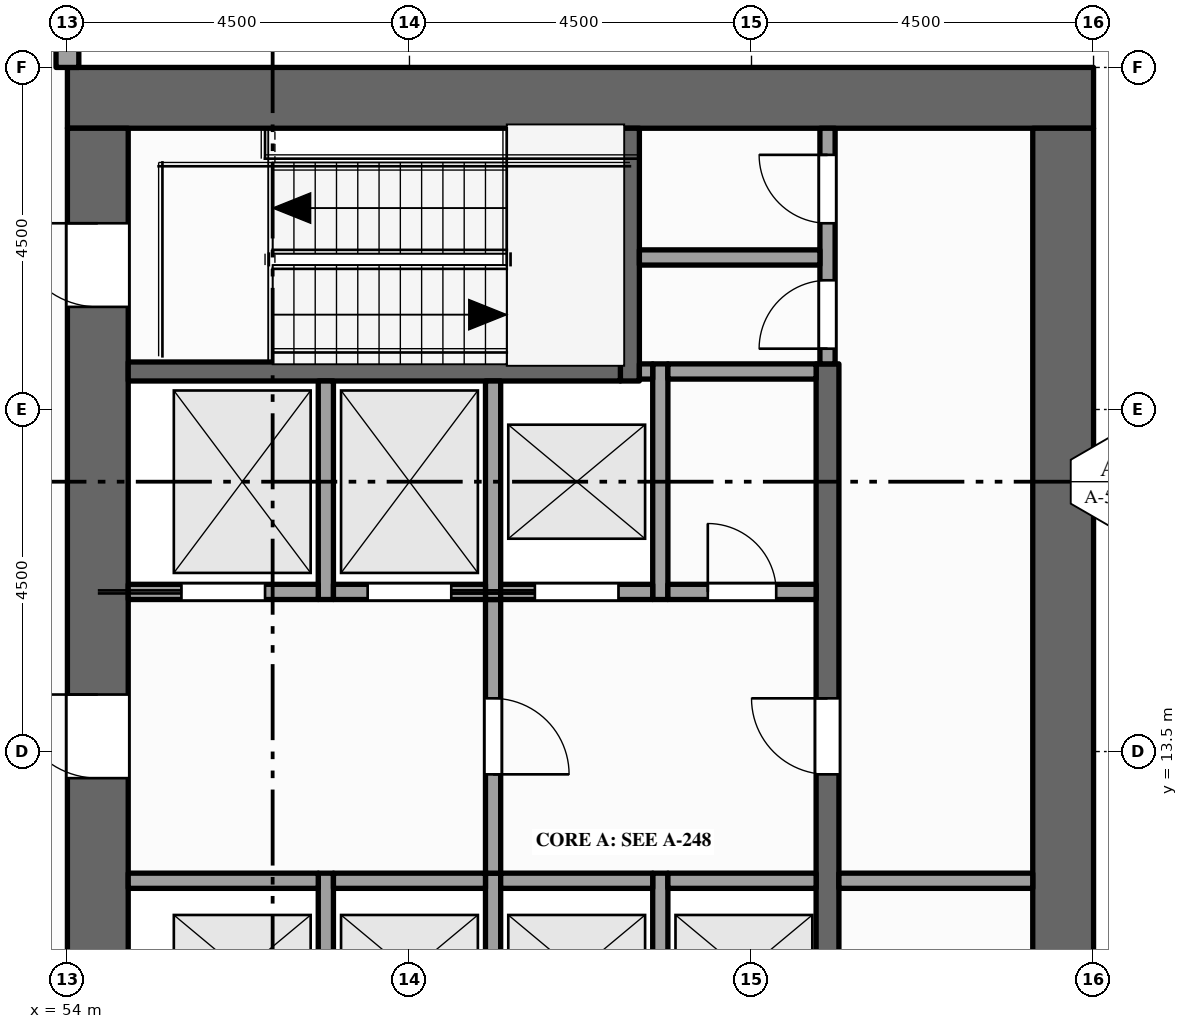
"""IFC4 building model, lengths in metres.
Left out: names, types, materials, properties, quantities, classifications, styles, units other than length and angle.
Written with IfcOpenShell. Run it as: python <this file> out.ifc"""

import sys

from ifc_helpers import new_model, si_unit, direction, frame, frame_2d, origin, place, context, subcontext, project, spatial, rectangle, extrude, element, fill, save


model = new_model("IFC4")
c1 = context("Model", 3, precision=1e-05, world=origin(), true_north=direction((0.0, 1.0)))
c2 = subcontext(c1, "Body", "Model", "MODEL_VIEW")
j1 = project(units=[si_unit("LENGTHUNIT", "METRE"), si_unit("PLANEANGLEUNIT", "RADIAN")], contexts=[c1])
p1 = place(None, origin())
s1 = spatial("IfcSite", under=j1, at=p1, CompositionType="ELEMENT")
p2 = place(p1, origin())
s2 = spatial("IfcBuilding", under=s1, at=p2, CompositionType="ELEMENT")
p3 = place(p2, frame((0.0, 0.0, 273.0)))
s3 = spatial("IfcBuildingStorey", under=s2, at=p3, CompositionType="ELEMENT", Elevation=273.0)
p4 = place(p3, frame((54.0, 22.1, -0.15), z_axis=(0.0, 0.0, 1.0), x_axis=(1.0, 0.0, 0.0)))
e1 = element("IfcWall", 1, at=p4, inside=s3, PredefinedType="SHEAR", context=c2, shape_type="SweptSolid", body=[
    extrude(rectangle(XDim=13.5, YDim=0.8, at=frame_2d((6.75, 0.0))), origin(), (0.0, 0.0, 1.0), 4.0),
])
p5 = place(p3, frame((54.4, 0.8, -0.15), z_axis=(0.0, 0.0, 1.0), x_axis=(0.0, 1.0, 0.0)))
e2 = element("IfcWall", 2, at=p5, inside=s3, PredefinedType="SHEAR", context=c2, shape_type="SweptSolid", body=[
    extrude(rectangle(XDim=20.9, YDim=0.8, at=frame_2d((10.45, 0.0))), origin(), (0.0, 0.0, 1.0), 4.0),
])
p6 = place(p5, frame((6.3, 0.0, 0.15)))
e3 = element("IfcOpeningElement", 3, at=p6, cuts=e2, PredefinedType="OPENING", context=c2, shape_type="SweptSolid", body=[
    extrude(rectangle(XDim=1.8, YDim=2.1, at=frame_2d((0.9, 1.05))), frame((0.0, 0.41, 0.0), z_axis=(0.0, -1.0, 0.0), x_axis=(1.0, 0.0, 0.0)), (0.0, 0.0, 1.0), 0.82),
])
p7 = place(p5, frame((12.35, 0.0, 0.15)))
e4 = element("IfcOpeningElement", 4, at=p7, cuts=e2, PredefinedType="OPENING", context=c2, shape_type="SweptSolid", body=[
    extrude(rectangle(XDim=1.1, YDim=2.1, at=frame_2d((0.55, 1.05))), frame((0.0, 0.41, 0.0), z_axis=(0.0, -1.0, 0.0), x_axis=(1.0, 0.0, 0.0)), (0.0, 0.0, 1.0), 0.82),
])
p8 = place(p5, frame((1.35, 0.0, 0.15)))
e5 = element("IfcOpeningElement", 5, at=p8, cuts=e2, PredefinedType="OPENING", context=c2, shape_type="SweptSolid", body=[
    extrude(rectangle(XDim=1.1, YDim=2.1, at=frame_2d((0.55, 1.05))), frame((0.0, 0.41, 0.0), z_axis=(0.0, -1.0, 0.0), x_axis=(1.0, 0.0, 0.0)), (0.0, 0.0, 1.0), 0.82),
])
p9 = place(p5, frame((18.55, 0.0, 0.15)))
e6 = element("IfcOpeningElement", 6, at=p9, cuts=e2, PredefinedType="OPENING", context=c2, shape_type="SweptSolid", body=[
    extrude(rectangle(XDim=1.1, YDim=2.1, at=frame_2d((0.55, 1.05))), frame((0.0, 0.41, 0.0), z_axis=(0.0, -1.0, 0.0), x_axis=(1.0, 0.0, 0.0)), (0.0, 0.0, 1.0), 0.82),
])
p10 = place(p3, frame((67.1, 0.8, -0.15), z_axis=(0.0, 0.0, 1.0), x_axis=(0.0, 1.0, 0.0)))
e7 = element("IfcWall", 7, at=p10, inside=s3, PredefinedType="SHEAR", context=c2, shape_type="SweptSolid", body=[
    extrude(rectangle(XDim=20.9, YDim=0.8, at=frame_2d((10.45, 0.0))), origin(), (0.0, 0.0, 1.0), 4.0),
])
p11 = place(p3, frame((54.0, 22.5, 0.0), z_axis=(0.0, 0.0, 1.0), x_axis=(0.0, 1.0, 0.0)))
e8 = element("IfcWall", 8, at=p11, inside=s3, PredefinedType="STANDARD", context=c2, shape_type="SweptSolid", body=[
    extrude(rectangle(XDim=1.175, YDim=0.3, at=frame_2d((0.587, 0.0))), origin(), (0.0, 0.0, 1.0), 3.162),
])
p12 = place(p3, frame((57.4, 9.3, 0.0), z_axis=(0.0, 0.0, 1.0), x_axis=(0.0, 1.0, 0.0)))
e9 = element("IfcWall", 9, at=p12, inside=s3, PredefinedType="SOLIDWALL", context=c2, shape_type="SweptSolid", body=[
    extrude(rectangle(XDim=2.6, YDim=0.2, at=frame_2d((1.3, 0.0))), origin(), (0.0, 0.0, 1.0), 3.85),
])
p13 = place(p3, frame((57.4, 15.5, 0.0), z_axis=(0.0, 0.0, 1.0), x_axis=(0.0, 1.0, 0.0)))
e10 = element("IfcWall", 10, at=p13, inside=s3, PredefinedType="SOLIDWALL", context=c2, shape_type="SweptSolid", body=[
    extrude(rectangle(XDim=2.875, YDim=0.2, at=frame_2d((1.438, 0.0))), origin(), (0.0, 0.0, 1.0), 3.85),
])
p14 = place(p3, frame((59.6, 9.3, 0.0), z_axis=(0.0, 0.0, 1.0), x_axis=(0.0, 1.0, 0.0)))
e11 = element("IfcWall", 11, at=p14, inside=s3, PredefinedType="SOLIDWALL", context=c2, shape_type="SweptSolid", body=[
    extrude(rectangle(XDim=2.6, YDim=0.2, at=frame_2d((1.3, 0.0))), origin(), (0.0, 0.0, 1.0), 3.85),
])
p15 = place(p3, frame((59.6, 11.9, 0.0), z_axis=(0.0, 0.0, 1.0), x_axis=(0.0, 1.0, 0.0)))
e12 = element("IfcWall", 12, at=p15, inside=s3, PredefinedType="PARTITIONING", context=c2, shape_type="SweptSolid", body=[
    extrude(rectangle(XDim=3.6, YDim=0.2, at=frame_2d((1.8, 0.0))), origin(), (0.0, 0.0, 1.0), 3.85),
])
p16 = place(p15, frame((1.3, 0.0, 0.0)))
e13 = element("IfcOpeningElement", 13, at=p16, cuts=e12, PredefinedType="OPENING", context=c2, shape_type="SweptSolid", body=[
    extrude(rectangle(XDim=1.0, YDim=2.1, at=frame_2d((0.5, 1.05))), frame((0.0, 0.11, 0.0), z_axis=(0.0, -1.0, 0.0), x_axis=(1.0, 0.0, 0.0)), (0.0, 0.0, 1.0), 0.22),
])
p17 = place(p3, frame((59.6, 15.5, 0.0), z_axis=(0.0, 0.0, 1.0), x_axis=(0.0, 1.0, 0.0)))
e14 = element("IfcWall", 14, at=p17, inside=s3, PredefinedType="SOLIDWALL", context=c2, shape_type="SweptSolid", body=[
    extrude(rectangle(XDim=2.875, YDim=0.2, at=frame_2d((1.438, 0.0))), origin(), (0.0, 0.0, 1.0), 3.85),
])
p18 = place(p3, frame((61.4, 18.375, 0.0), z_axis=(0.0, 0.0, 1.0), x_axis=(0.0, 1.0, 0.0)))
e15 = element("IfcWall", 15, at=p18, inside=s3, PredefinedType="SHEAR", context=c2, shape_type="SweptSolid", body=[
    extrude(rectangle(XDim=3.325, YDim=0.25, at=frame_2d((1.663, 0.0))), origin(), (0.0, 0.0, 1.0), 3.85),
])
p19 = place(p3, frame((61.8, 9.3, 0.0), z_axis=(0.0, 0.0, 1.0), x_axis=(0.0, 1.0, 0.0)))
e16 = element("IfcWall", 16, at=p19, inside=s3, PredefinedType="SOLIDWALL", context=c2, shape_type="SweptSolid", body=[
    extrude(rectangle(XDim=2.6, YDim=0.2, at=frame_2d((1.3, 0.0))), origin(), (0.0, 0.0, 1.0), 3.85),
])
p20 = place(p3, frame((61.8, 15.5, 0.0), z_axis=(0.0, 0.0, 1.0), x_axis=(0.0, 1.0, 0.0)))
e17 = element("IfcWall", 17, at=p20, inside=s3, PredefinedType="SOLIDWALL", context=c2, shape_type="SweptSolid", body=[
    extrude(rectangle(XDim=3.1, YDim=0.2, at=frame_2d((1.55, 0.0))), origin(), (0.0, 0.0, 1.0), 3.85),
])
p21 = place(p3, frame((64.0, 4.1, 0.0), z_axis=(0.0, 0.0, 1.0), x_axis=(0.0, 1.0, 0.0)))
e18 = element("IfcWall", 18, at=p21, inside=s3, PredefinedType="SHEAR", context=c2, shape_type="SweptSolid", body=[
    extrude(rectangle(XDim=14.5, YDim=0.3, at=frame_2d((7.25, 0.0))), origin(), (0.0, 0.0, 1.0), 3.85),
])
p22 = place(p21, frame((3.4, 0.0, 0.0)))
e19 = element("IfcOpeningElement", 19, at=p22, cuts=e18, PredefinedType="OPENING", context=c2, shape_type="SweptSolid", body=[
    extrude(rectangle(XDim=1.0, YDim=2.1, at=frame_2d((0.5, 1.05))), frame((0.0, 0.16, 0.0), z_axis=(0.0, -1.0, 0.0), x_axis=(1.0, 0.0, 0.0)), (0.0, 0.0, 1.0), 0.32),
])
p23 = place(p21, frame((9.1, 0.0, 0.0)))
e20 = element("IfcOpeningElement", 20, at=p23, cuts=e18, PredefinedType="OPENING", context=c2, shape_type="SweptSolid", body=[
    extrude(rectangle(XDim=1.0, YDim=2.1, at=frame_2d((0.5, 1.05))), frame((0.0, 0.16, 0.0), z_axis=(0.0, -1.0, 0.0), x_axis=(1.0, 0.0, 0.0)), (0.0, 0.0, 1.0), 0.32),
])
p24 = place(p3, frame((64.0, 18.6, 0.0), z_axis=(0.0, 0.0, 1.0), x_axis=(0.0, 1.0, 0.0)))
e21 = element("IfcWall", 21, at=p24, inside=s3, PredefinedType="PARTITIONING", context=c2, shape_type="SweptSolid", body=[
    extrude(rectangle(XDim=3.1, YDim=0.2, at=frame_2d((1.55, 0.0))), origin(), (0.0, 0.0, 1.0), 3.85),
])
p25 = place(p24, frame((0.2, 0.0, 0.0)))
e22 = element("IfcOpeningElement", 22, at=p25, cuts=e21, PredefinedType="OPENING", context=c2, shape_type="SweptSolid", body=[
    extrude(rectangle(XDim=0.9, YDim=2.1, at=frame_2d((0.45, 1.05))), frame((0.0, 0.11, 0.0), z_axis=(0.0, -1.0, 0.0), x_axis=(1.0, 0.0, 0.0)), (0.0, 0.0, 1.0), 0.22),
])
p26 = place(p24, frame((1.85, 0.0, 0.0)))
e23 = element("IfcOpeningElement", 23, at=p26, cuts=e21, PredefinedType="OPENING", context=c2, shape_type="SweptSolid", body=[
    extrude(rectangle(XDim=0.9, YDim=2.1, at=frame_2d((0.45, 1.05))), frame((0.0, 0.11, 0.0), z_axis=(0.0, -1.0, 0.0), x_axis=(1.0, 0.0, 0.0)), (0.0, 0.0, 1.0), 0.22),
])
p27 = place(p3, frame((54.8, 11.8, 0.0), z_axis=(0.0, 0.0, 1.0), x_axis=(1.0, 0.0, 0.0)))
e24 = element("IfcWall", 24, at=p27, inside=s3, PredefinedType="SOLIDWALL", context=c2, shape_type="SweptSolid", body=[
    extrude(rectangle(XDim=2.5, YDim=0.2, at=frame_2d((1.25, 0.0))), origin(), (0.0, 0.0, 1.0), 3.85),
])
for number, where, z_axis, x_axis in (
    (25, (57.5, 11.8, 0.0), (0.0, 0.0, 1.0), (1.0, 0.0, 0.0)),
    (26, (59.7, 11.8, 0.0), (0.0, 0.0, 1.0), (1.0, 0.0, 0.0)),
):
    element("IfcWall", number, at=place(p3, frame(where, z_axis=z_axis, x_axis=x_axis)), inside=s3, PredefinedType="SOLIDWALL", context=c2, shape_type="SweptSolid", body=[
        extrude(rectangle(XDim=2.0, YDim=0.2, at=frame_2d((1.0, 0.0))), origin(), (0.0, 0.0, 1.0), 3.85),
    ])
p28 = place(p3, frame((61.9, 11.8, 0.0), z_axis=(0.0, 0.0, 1.0), x_axis=(1.0, 0.0, 0.0)))
e27 = element("IfcWall", 27, at=p28, inside=s3, PredefinedType="SOLIDWALL", context=c2, shape_type="SweptSolid", body=[
    extrude(rectangle(XDim=1.95, YDim=0.2, at=frame_2d((0.975, 0.0))), origin(), (0.0, 0.0, 1.0), 3.85),
])
p29 = place(p3, frame((64.15, 11.8, 0.0), z_axis=(0.0, 0.0, 1.0), x_axis=(1.0, 0.0, 0.0)))
e28 = element("IfcWall", 28, at=p29, inside=s3, PredefinedType="PARTITIONING", context=c2, shape_type="SweptSolid", body=[
    extrude(rectangle(XDim=2.55, YDim=0.2, at=frame_2d((1.275, 0.0))), origin(), (0.0, 0.0, 1.0), 3.85),
])
p30 = place(p3, frame((54.8, 15.6, 0.0), z_axis=(0.0, 0.0, 1.0), x_axis=(1.0, 0.0, 0.0)))
e29 = element("IfcWall", 29, at=p30, inside=s3, PredefinedType="SOLIDWALL", context=c2, shape_type="SweptSolid", body=[
    extrude(rectangle(XDim=2.5, YDim=0.2, at=frame_2d((1.25, 0.0))), origin(), (0.0, 0.0, 1.0), 3.85),
])
p31 = place(p30, frame((0.7, 0.0, 0.012)))
e30 = element("IfcOpeningElement", 30, at=p31, cuts=e29, PredefinedType="OPENING", context=c2, shape_type="SweptSolid", body=[
    extrude(rectangle(XDim=1.1, YDim=2.1, at=frame_2d((0.55, 1.05))), frame((0.0, 0.11, 0.0), z_axis=(0.0, -1.0, 0.0), x_axis=(1.0, 0.0, 0.0)), (0.0, 0.0, 1.0), 0.22),
])
p32 = place(p3, frame((57.5, 15.6, 0.0), z_axis=(0.0, 0.0, 1.0), x_axis=(1.0, 0.0, 0.0)))
e31 = element("IfcWall", 31, at=p32, inside=s3, PredefinedType="SOLIDWALL", context=c2, shape_type="SweptSolid", body=[
    extrude(rectangle(XDim=2.0, YDim=0.2, at=frame_2d((1.0, 0.0))), origin(), (0.0, 0.0, 1.0), 3.85),
])
p33 = place(p32, frame((0.45, 0.0, 0.012)))
e32 = element("IfcOpeningElement", 32, at=p33, cuts=e31, PredefinedType="OPENING", context=c2, shape_type="SweptSolid", body=[
    extrude(rectangle(XDim=1.1, YDim=2.1, at=frame_2d((0.55, 1.05))), frame((0.0, 0.11, 0.0), z_axis=(0.0, -1.0, 0.0), x_axis=(1.0, 0.0, 0.0)), (0.0, 0.0, 1.0), 0.22),
])
p34 = place(p3, frame((59.7, 15.6, 0.0), z_axis=(0.0, 0.0, 1.0), x_axis=(1.0, 0.0, 0.0)))
e33 = element("IfcWall", 33, at=p34, inside=s3, PredefinedType="SOLIDWALL", context=c2, shape_type="SweptSolid", body=[
    extrude(rectangle(XDim=2.0, YDim=0.2, at=frame_2d((1.0, 0.0))), origin(), (0.0, 0.0, 1.0), 3.85),
])
p35 = place(p34, frame((0.45, 0.0, 0.012)))
e34 = element("IfcOpeningElement", 34, at=p35, cuts=e33, PredefinedType="OPENING", context=c2, shape_type="SweptSolid", body=[
    extrude(rectangle(XDim=1.1, YDim=2.1, at=frame_2d((0.55, 1.05))), frame((0.0, 0.11, 0.0), z_axis=(0.0, -1.0, 0.0), x_axis=(1.0, 0.0, 0.0)), (0.0, 0.0, 1.0), 0.22),
])
p36 = place(p3, frame((61.9, 15.6, 0.0), z_axis=(0.0, 0.0, 1.0), x_axis=(1.0, 0.0, 0.0)))
e35 = element("IfcWall", 35, at=p36, inside=s3, PredefinedType="PARTITIONING", context=c2, shape_type="SweptSolid", body=[
    extrude(rectangle(XDim=1.95, YDim=0.2, at=frame_2d((0.975, 0.0))), origin(), (0.0, 0.0, 1.0), 3.85),
])
p37 = place(p36, frame((0.525, 0.0, 0.0)))
e36 = element("IfcOpeningElement", 36, at=p37, cuts=e35, PredefinedType="OPENING", context=c2, shape_type="SweptSolid", body=[
    extrude(rectangle(XDim=0.9, YDim=2.1, at=frame_2d((0.45, 1.05))), frame((0.0, 0.11, 0.0), z_axis=(0.0, -1.0, 0.0), x_axis=(1.0, 0.0, 0.0)), (0.0, 0.0, 1.0), 0.22),
])
p38 = place(p3, frame((54.8, 18.5, 0.0), z_axis=(0.0, 0.0, 1.0), x_axis=(1.0, 0.0, 0.0)))
e37 = element("IfcWall", 37, at=p38, inside=s3, PredefinedType="SHEAR", context=c2, shape_type="SweptSolid", body=[
    extrude(rectangle(XDim=6.475, YDim=0.25, at=frame_2d((3.237, 0.0))), origin(), (0.0, 0.0, 1.0), 3.85),
])
p39 = place(p3, frame((61.525, 18.5, 0.0), z_axis=(0.0, 0.0, 1.0), x_axis=(1.0, 0.0, 0.0)))
e38 = element("IfcWall", 38, at=p39, inside=s3, PredefinedType="SOLIDWALL", context=c2, shape_type="SweptSolid", body=[
    extrude(rectangle(XDim=0.175, YDim=0.2, at=frame_2d((0.087, 0.0))), origin(), (0.0, 0.0, 1.0), 3.85),
])
p40 = place(p3, frame((61.9, 18.5, 0.0), z_axis=(0.0, 0.0, 1.0), x_axis=(1.0, 0.0, 0.0)))
e39 = element("IfcWall", 39, at=p40, inside=s3, PredefinedType="PARTITIONING", context=c2, shape_type="SweptSolid", body=[
    extrude(rectangle(XDim=1.95, YDim=0.2, at=frame_2d((0.975, 0.0))), origin(), (0.0, 0.0, 1.0), 3.85),
])
p41 = place(p3, frame((61.525, 20.0, 0.0), z_axis=(0.0, 0.0, 1.0), x_axis=(1.0, 0.0, 0.0)))
e40 = element("IfcWall", 40, at=p41, inside=s3, PredefinedType="PARTITIONING", context=c2, shape_type="SweptSolid", body=[
    extrude(rectangle(XDim=2.375, YDim=0.2, at=frame_2d((1.188, 0.0))), origin(), (0.0, 0.0, 1.0), 3.85),
])
p42 = place(p31, origin())
e41 = element("IfcDoor", 41, at=p42, inside=s3, OperationType="SLIDING_TO_LEFT", PredefinedType="DOOR", context=c2, shape_type="SweptSolid", body=[
    extrude(rectangle(XDim=1.1, YDim=2.1, at=frame_2d((0.55, 1.05))), frame((0.0, 0.025, 0.0), z_axis=(0.0, -1.0, 0.0), x_axis=(1.0, 0.0, 0.0)), (0.0, 0.0, 1.0), 0.05),
])
fill(e30, e41)
p43 = place(p33, origin())
e42 = element("IfcDoor", 42, at=p43, inside=s3, OperationType="SLIDING_TO_RIGHT", PredefinedType="DOOR", context=c2, shape_type="SweptSolid", body=[
    extrude(rectangle(XDim=1.1, YDim=2.1, at=frame_2d((0.55, 1.05))), frame((0.0, 0.025, 0.0), z_axis=(0.0, -1.0, 0.0), x_axis=(1.0, 0.0, 0.0)), (0.0, 0.0, 1.0), 0.05),
])
fill(e32, e42)
p44 = place(p35, origin())
e43 = element("IfcDoor", 43, at=p44, inside=s3, OperationType="SLIDING_TO_LEFT", PredefinedType="DOOR", context=c2, shape_type="SweptSolid", body=[
    extrude(rectangle(XDim=1.1, YDim=2.1, at=frame_2d((0.55, 1.05))), frame((0.0, 0.025, 0.0), z_axis=(0.0, -1.0, 0.0), x_axis=(1.0, 0.0, 0.0)), (0.0, 0.0, 1.0), 0.05),
])
fill(e34, e43)
p45 = place(p7, origin())
e44 = element("IfcDoor", 44, at=p45, inside=s3, OperationType="SINGLE_SWING_RIGHT", PredefinedType="DOOR", context=c2, shape_type="SweptSolid", body=[
    extrude(rectangle(XDim=1.1, YDim=2.1, at=frame_2d((0.55, 1.05))), frame((0.0, 0.025, 0.0), z_axis=(0.0, -1.0, 0.0), x_axis=(1.0, 0.0, 0.0)), (0.0, 0.0, 1.0), 0.05),
])
fill(e4, e44)
p46 = place(p16, origin())
e45 = element("IfcDoor", 45, at=p46, inside=s3, OperationType="SINGLE_SWING_LEFT", PredefinedType="DOOR", context=c2, shape_type="SweptSolid", body=[
    extrude(rectangle(XDim=1.0, YDim=2.1, at=frame_2d((0.5, 1.05))), frame((0.0, 0.025, 0.0), z_axis=(0.0, -1.0, 0.0), x_axis=(1.0, 0.0, 0.0)), (0.0, 0.0, 1.0), 0.05),
])
fill(e13, e45)
p47 = place(p23, origin())
e46 = element("IfcDoor", 46, at=p47, inside=s3, OperationType="SINGLE_SWING_RIGHT", PredefinedType="DOOR", context=c2, shape_type="SweptSolid", body=[
    extrude(rectangle(XDim=1.0, YDim=2.1, at=frame_2d((0.5, 1.05))), frame((0.0, 0.025, 0.0), z_axis=(0.0, -1.0, 0.0), x_axis=(1.0, 0.0, 0.0)), (0.0, 0.0, 1.0), 0.05),
])
fill(e20, e46)
p48 = place(p9, origin())
e47 = element("IfcDoor", 47, at=p48, inside=s3, OperationType="SINGLE_SWING_RIGHT", PredefinedType="DOOR", context=c2, shape_type="SweptSolid", body=[
    extrude(rectangle(XDim=1.1, YDim=2.1, at=frame_2d((0.55, 1.05))), frame((0.0, 0.025, 0.0), z_axis=(0.0, -1.0, 0.0), x_axis=(1.0, 0.0, 0.0)), (0.0, 0.0, 1.0), 0.05),
])
fill(e6, e47)
p49 = place(p25, origin())
e48 = element("IfcDoor", 48, at=p49, inside=s3, OperationType="SINGLE_SWING_LEFT", PredefinedType="DOOR", context=c2, shape_type="SweptSolid", body=[
    extrude(rectangle(XDim=0.9, YDim=2.1, at=frame_2d((0.45, 1.05))), frame((0.0, 0.025, 0.0), z_axis=(0.0, -1.0, 0.0), x_axis=(1.0, 0.0, 0.0)), (0.0, 0.0, 1.0), 0.05),
])
fill(e22, e48)
p50 = place(p26, origin())
e49 = element("IfcDoor", 49, at=p50, inside=s3, OperationType="SINGLE_SWING_RIGHT", PredefinedType="DOOR", context=c2, shape_type="SweptSolid", body=[
    extrude(rectangle(XDim=0.9, YDim=2.1, at=frame_2d((0.45, 1.05))), frame((0.0, 0.025, 0.0), z_axis=(0.0, -1.0, 0.0), x_axis=(1.0, 0.0, 0.0)), (0.0, 0.0, 1.0), 0.05),
])
fill(e23, e49)
p51 = place(p37, origin())
e50 = element("IfcDoor", 50, at=p51, inside=s3, OperationType="SINGLE_SWING_LEFT", PredefinedType="DOOR", context=c2, shape_type="SweptSolid", body=[
    extrude(rectangle(XDim=0.9, YDim=2.1, at=frame_2d((0.45, 1.05))), frame((0.0, 0.025, 0.0), z_axis=(0.0, -1.0, 0.0), x_axis=(1.0, 0.0, 0.0)), (0.0, 0.0, 1.0), 0.05),
])
fill(e36, e50)
save(model, sys.argv[1])
